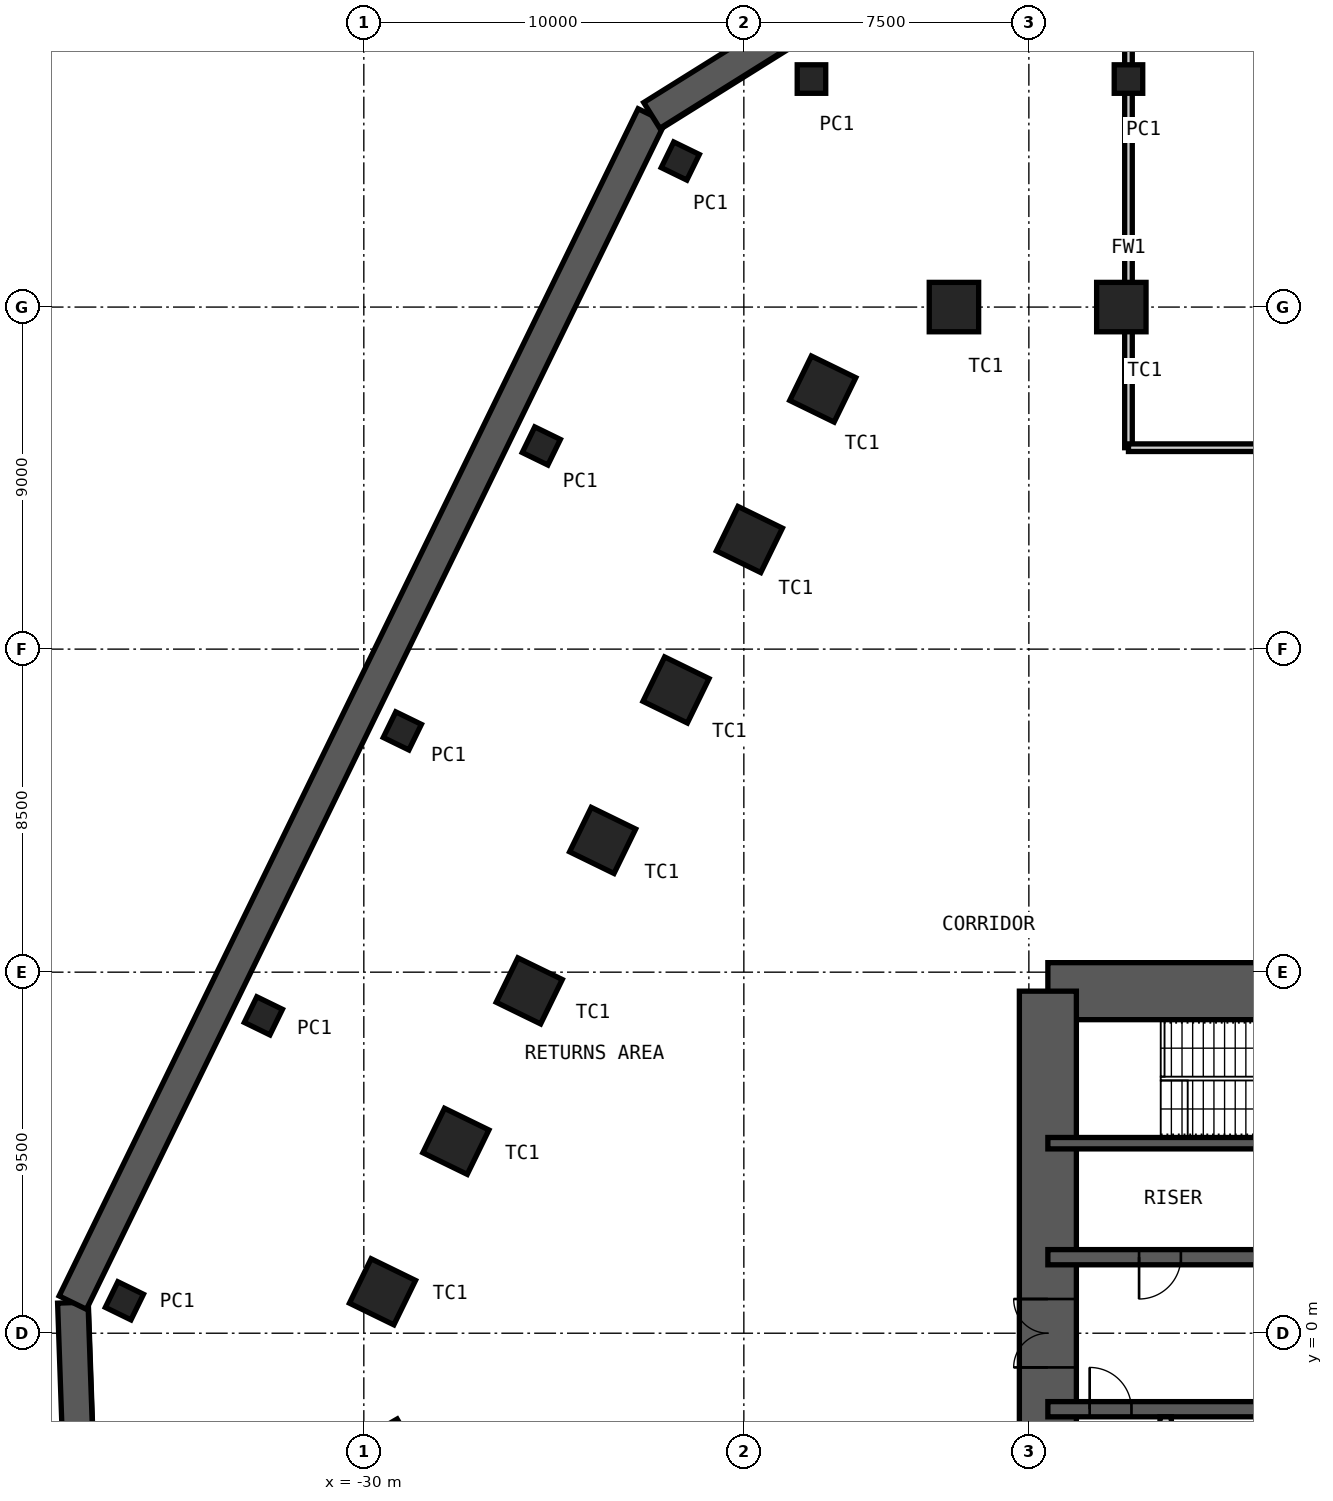
"""IFC4 building model, lengths in metres.
Left out: names, types, materials, properties, quantities, classifications, styles, units other than length and angle.
Written with IfcOpenShell. Run it as: python <this file> out.ifc"""

import sys

from ifc_helpers import new_model, si_unit, direction, frame, frame_2d, origin, origin_2d, place, context, subcontext, project, spatial, rectangle, hollow_rectangle, extrude, element, fill, save


model = new_model("IFC4")
c1 = context("Model", 3, precision=1e-05, world=origin(), true_north=direction((0.0, 1.0)))
c2 = subcontext(c1, "Body", "Model", "MODEL_VIEW")
j1 = project(units=[si_unit("LENGTHUNIT", "METRE"), si_unit("PLANEANGLEUNIT", "RADIAN")], contexts=[c1])
p1 = place(None, origin())
s1 = spatial("IfcSite", under=j1, at=p1, CompositionType="ELEMENT")
p2 = place(p1, origin())
s2 = spatial("IfcBuilding", under=s1, at=p2, CompositionType="ELEMENT")
p3 = place(p2, frame((0.0, 0.0, -6.0)))
s3 = spatial("IfcBuildingStorey", under=s2, at=p3, CompositionType="ELEMENT", Elevation=-6.0)
p4 = place(p3, frame((-37.51, -3.43, 0.0), z_axis=(0.0, 0.0, 1.0), x_axis=(-0.034908677553, 0.999390506375, 0.0)))
e1 = element("IfcWall", 1, at=p4, inside=s3, PredefinedType="SHEAR", context=c2, shape_type="SweptSolid", body=[
    extrude(rectangle(XDim=4.238, YDim=0.8, at=frame_2d((2.119, 0.0))), origin(), (0.0, 0.0, 1.0), 6.0),
])
p5 = place(p3, frame((-37.658, 0.805, 0.0), z_axis=(0.0, 0.0, 1.0), x_axis=(0.438371731429, 0.898793761151, 0.0)))
e2 = element("IfcWall", 2, at=p5, inside=s3, PredefinedType="SHEAR", context=c2, shape_type="SweptSolid", body=[
    extrude(rectangle(XDim=34.755, YDim=0.8, at=frame_2d((17.377, 0.0))), origin(), (0.0, 0.0, 1.0), 6.0),
])
p6 = place(p3, frame((-22.423, 32.043, 0.0), z_axis=(0.0, 0.0, 1.0), x_axis=(0.848065686315, 0.529891113055, 0.0)))
e3 = element("IfcWall", 3, at=p6, inside=s3, PredefinedType="SHEAR", context=c2, shape_type="SweptSolid", body=[
    extrude(rectangle(XDim=4.071, YDim=0.8, at=frame_2d((2.035, 0.0))), origin(), (0.0, 0.0, 1.0), 6.0),
])
for number, where, z_axis, x_axis in (
    (4, (-14.471, 27.0, 0.0), (0.0, 0.0, 1.0), (-1.0, 0.0, 0.0)),
    (5, (-10.067, 27.0, 0.0), (0.0, 0.0, 1.0), (-1.0, 0.0, 0.0)),
    (6, (-29.361, -3.146, 0.0), (0.0, 0.0, 1.0), (0.5, -0.866, 0.0)),
    (7, (-29.509, 1.09, 0.0), (0.0, 0.0, 1.0), (-0.438, -0.899, 0.0)),
    (8, (-27.578, 5.049, 0.0), (0.0, 0.0, 1.0), (-0.438, -0.899, 0.0)),
    (9, (-25.647, 9.008, 0.0), (0.0, 0.0, 1.0), (-0.438, -0.899, 0.0)),
    (10, (-23.716, 12.966, 0.0), (0.0, 0.0, 1.0), (-0.438, -0.899, 0.0)),
    (11, (-21.785, 16.925, 0.0), (0.0, 0.0, 1.0), (-0.438, -0.899, 0.0)),
    (12, (-19.854, 20.884, 0.0), (0.0, 0.0, 1.0), (-0.438, -0.899, 0.0)),
    (13, (-17.924, 24.843, 0.0), (0.0, 0.0, 1.0), (-0.438, -0.899, 0.0)),
):
    element("IfcColumn", number, at=place(p3, frame(where, z_axis=z_axis, x_axis=x_axis)), inside=s3, PredefinedType="COLUMN", context=c2, shape_type="SweptSolid", body=[
        extrude(hollow_rectangle(XDim=1.3, YDim=1.3, WallThickness=0.1, at=origin_2d()), origin(), (0.0, 0.0, 1.0), 6.0),
    ])
for number, where, z_axis, x_axis in (
    (14, (-18.221, 33.0, 0.0), (0.0, 0.0, 1.0), (-1.0, 0.0, 0.0)),
    (15, (-9.879, 33.0, 0.0), (0.0, 0.0, 1.0), (-1.0, 0.0, 0.0)),
    (16, (-36.3, 0.853, 0.0), (0.0, 0.0, 1.0), (-0.438, -0.899, 0.0)),
    (17, (-32.643, 8.35, 0.0), (0.0, 0.0, 1.0), (-0.438, -0.899, 0.0)),
    (18, (-28.986, 15.848, 0.0), (0.0, 0.0, 1.0), (-0.438, -0.899, 0.0)),
    (19, (-25.33, 23.345, 0.0), (0.0, 0.0, 1.0), (-0.438, -0.899, 0.0)),
    (20, (-21.673, 30.843, 0.0), (0.0, 0.0, 1.0), (-0.438, -0.899, 0.0)),
):
    element("IfcColumn", number, at=place(p3, frame(where, z_axis=z_axis, x_axis=x_axis)), inside=s3, PredefinedType="COLUMN", context=c2, shape_type="SweptSolid", body=[
        extrude(hollow_rectangle(XDim=0.75, YDim=0.75, WallThickness=0.036, at=origin_2d()), origin(), (0.0, 0.0, 1.0), 6.0),
    ])
p7 = place(p3, frame((-12.0, 9.0, 0.0), z_axis=(0.0, 0.0, 1.0), x_axis=(1.0, 0.0, 0.0)))
e21 = element("IfcWall", 21, at=p7, inside=s3, PredefinedType="SHEAR", context=c2, shape_type="SweptSolid", body=[
    extrude(rectangle(XDim=24.0, YDim=1.5, at=frame_2d((12.0, 0.0))), origin(), (0.0, 0.0, 1.0), 6.0),
])
p8 = place(p7, frame((10.4, 0.0, 0.0)))
e22 = element("IfcOpeningElement", 22, at=p8, cuts=e21, PredefinedType="OPENING", context=c2, shape_type="SweptSolid", body=[
    extrude(rectangle(XDim=1.0, YDim=2.1, at=frame_2d((0.5, 1.05))), frame((0.0, 0.76, 0.0), z_axis=(0.0, -1.0, 0.0), x_axis=(1.0, 0.0, 0.0)), (0.0, 0.0, 1.0), 1.52),
])
p9 = place(p7, frame((17.6, 0.0, 0.0)))
e23 = element("IfcOpeningElement", 23, at=p9, cuts=e21, PredefinedType="OPENING", context=c2, shape_type="SweptSolid", body=[
    extrude(rectangle(XDim=0.9, YDim=2.1, at=frame_2d((0.45, 1.05))), frame((0.0, 0.76, 0.0), z_axis=(0.0, -1.0, 0.0), x_axis=(1.0, 0.0, 0.0)), (0.0, 0.0, 1.0), 1.52),
])
p10 = place(p7, frame((21.9, 0.0, 0.0)))
e24 = element("IfcOpeningElement", 24, at=p10, cuts=e21, PredefinedType="OPENING", context=c2, shape_type="SweptSolid", body=[
    extrude(rectangle(XDim=0.9, YDim=2.1, at=frame_2d((0.45, 1.05))), frame((0.0, 0.76, 0.0), z_axis=(0.0, -1.0, 0.0), x_axis=(1.0, 0.0, 0.0)), (0.0, 0.0, 1.0), 1.52),
])
p11 = place(p3, frame((-12.0, -9.0, 0.0), z_axis=(0.0, 0.0, 1.0), x_axis=(0.0, 1.0, 0.0)))
e25 = element("IfcWall", 25, at=p11, inside=s3, PredefinedType="SHEAR", context=c2, shape_type="SweptSolid", body=[
    extrude(rectangle(XDim=18.0, YDim=1.5, at=frame_2d((9.0, 0.0))), origin(), (0.0, 0.0, 1.0), 6.0),
])
p12 = place(p11, frame((8.1, 0.0, 0.0)))
e26 = element("IfcOpeningElement", 26, at=p12, cuts=e25, PredefinedType="OPENING", context=c2, shape_type="SweptSolid", body=[
    extrude(rectangle(XDim=1.8, YDim=2.1, at=frame_2d((0.9, 1.05))), frame((0.0, 0.76, 0.0), z_axis=(0.0, -1.0, 0.0), x_axis=(1.0, 0.0, 0.0)), (0.0, 0.0, 1.0), 1.52),
])
p13 = place(p3, frame((-12.0, 5.0, 0.0), z_axis=(0.0, 0.0, 1.0), x_axis=(1.0, 0.0, 0.0)))
e27 = element("IfcWall", 27, at=p13, inside=s3, PredefinedType="SHEAR", context=c2, shape_type="SweptSolid", body=[
    extrude(rectangle(XDim=24.0, YDim=0.3, at=frame_2d((12.0, 0.0))), origin(), (0.0, 0.0, 1.0), 6.0),
])
p14 = place(p3, frame((-12.0, 2.0, 0.0), z_axis=(0.0, 0.0, 1.0), x_axis=(1.0, 0.0, 0.0)))
e28 = element("IfcWall", 28, at=p14, inside=s3, PredefinedType="SHEAR", context=c2, shape_type="SweptSolid", body=[
    extrude(rectangle(XDim=24.0, YDim=0.4, at=frame_2d((12.0, 0.0))), origin(), (0.0, 0.0, 1.0), 6.0),
])
p15 = place(p14, frame((2.4, 0.0, 0.0)))
e29 = element("IfcOpeningElement", 29, at=p15, cuts=e28, PredefinedType="OPENING", context=c2, shape_type="SweptSolid", body=[
    extrude(rectangle(XDim=1.1, YDim=2.1, at=frame_2d((0.55, 1.05))), frame((0.0, 0.21, 0.0), z_axis=(0.0, -1.0, 0.0), x_axis=(1.0, 0.0, 0.0)), (0.0, 0.0, 1.0), 0.42),
])
p16 = place(p14, frame((22.0, 0.0, 0.0)))
e30 = element("IfcOpeningElement", 30, at=p16, cuts=e28, PredefinedType="OPENING", context=c2, shape_type="SweptSolid", body=[
    extrude(rectangle(XDim=1.1, YDim=2.1, at=frame_2d((0.55, 1.05))), frame((0.0, 0.21, 0.0), z_axis=(0.0, -1.0, 0.0), x_axis=(1.0, 0.0, 0.0)), (0.0, 0.0, 1.0), 0.42),
])
p17 = place(p14, frame((10.15, 0.0, 0.0)))
e31 = element("IfcOpeningElement", 31, at=p17, cuts=e28, PredefinedType="OPENING", context=c2, shape_type="SweptSolid", body=[
    extrude(rectangle(XDim=1.0, YDim=2.1, at=frame_2d((0.5, 1.05))), frame((0.0, 0.21, 0.0), z_axis=(0.0, -1.0, 0.0), x_axis=(1.0, 0.0, 0.0)), (0.0, 0.0, 1.0), 0.42),
])
p18 = place(p14, frame((6.7, 0.0, 0.0)))
e32 = element("IfcOpeningElement", 32, at=p18, cuts=e28, PredefinedType="OPENING", context=c2, shape_type="SweptSolid", body=[
    extrude(rectangle(XDim=1.4, YDim=2.4, at=frame_2d((0.7, 1.2))), frame((0.0, 0.21, 0.0), z_axis=(0.0, -1.0, 0.0), x_axis=(1.0, 0.0, 0.0)), (0.0, 0.0, 1.0), 0.42),
])
p19 = place(p3, frame((-12.0, -2.0, 0.0), z_axis=(0.0, 0.0, 1.0), x_axis=(1.0, 0.0, 0.0)))
e33 = element("IfcWall", 33, at=p19, inside=s3, PredefinedType="SHEAR", context=c2, shape_type="SweptSolid", body=[
    extrude(rectangle(XDim=24.0, YDim=0.4, at=frame_2d((12.0, 0.0))), origin(), (0.0, 0.0, 1.0), 6.0),
])
p20 = place(p19, frame((1.1, 0.0, 0.0)))
e34 = element("IfcOpeningElement", 34, at=p20, cuts=e33, PredefinedType="OPENING", context=c2, shape_type="SweptSolid", body=[
    extrude(rectangle(XDim=1.1, YDim=2.1, at=frame_2d((0.55, 1.05))), frame((0.0, 0.21, 0.0), z_axis=(0.0, -1.0, 0.0), x_axis=(1.0, 0.0, 0.0)), (0.0, 0.0, 1.0), 0.42),
])
p21 = place(p19, frame((13.55, 0.0, 0.0)))
e35 = element("IfcOpeningElement", 35, at=p21, cuts=e33, PredefinedType="OPENING", context=c2, shape_type="SweptSolid", body=[
    extrude(rectangle(XDim=1.1, YDim=2.1, at=frame_2d((0.55, 1.05))), frame((0.0, 0.21, 0.0), z_axis=(0.0, -1.0, 0.0), x_axis=(1.0, 0.0, 0.0)), (0.0, 0.0, 1.0), 0.42),
])
p22 = place(p19, frame((20.7, 0.0, 0.0)))
e36 = element("IfcOpeningElement", 36, at=p22, cuts=e33, PredefinedType="OPENING", context=c2, shape_type="SweptSolid", body=[
    extrude(rectangle(XDim=1.1, YDim=2.1, at=frame_2d((0.55, 1.05))), frame((0.0, 0.21, 0.0), z_axis=(0.0, -1.0, 0.0), x_axis=(1.0, 0.0, 0.0)), (0.0, 0.0, 1.0), 0.42),
])
p23 = place(p3, frame((-8.9, -4.85, 0.0), z_axis=(0.0, 0.0, 1.0), x_axis=(0.0, 1.0, 0.0)))
e37 = element("IfcWall", 37, at=p23, inside=s3, PredefinedType="PARTITIONING", context=c2, shape_type="SweptSolid", body=[
    extrude(rectangle(XDim=2.65, YDim=0.3, at=frame_2d((1.325, 0.0))), origin(), (0.0, 0.0, 1.0), 5.78),
])
p24 = place(p3, frame((-9.879, 33.8, 0.0), z_axis=(0.0, 0.0, 1.0), x_axis=(0.0, -1.0, 0.0)))
e38 = element("IfcWall", 38, at=p24, inside=s3, PredefinedType="PARTITIONING", context=c2, shape_type="SweptSolid", body=[
    extrude(rectangle(XDim=10.5, YDim=0.2, at=frame_2d((5.25, 0.0))), origin(), (0.0, 0.0, 1.0), 5.75),
])
p25 = place(p3, frame((-9.879, 23.3, 0.0), z_axis=(0.0, 0.0, 1.0), x_axis=(1.0, 0.0, 0.0)))
e39 = element("IfcWall", 39, at=p25, inside=s3, PredefinedType="PARTITIONING", context=c2, shape_type="SweptSolid", body=[
    extrude(rectangle(XDim=16.684, YDim=0.2, at=frame_2d((8.342, 0.0))), origin(), (0.0, 0.0, 1.0), 5.75),
])
p26 = place(p25, frame((7.342, 0.0, 0.0)))
e40 = element("IfcOpeningElement", 40, at=p26, cuts=e39, PredefinedType="OPENING", context=c2, shape_type="SweptSolid", body=[
    extrude(rectangle(XDim=2.0, YDim=2.4, at=frame_2d((1.0, 1.2))), frame((0.0, 0.11, 0.0), z_axis=(0.0, -1.0, 0.0), x_axis=(1.0, 0.0, 0.0)), (0.0, 0.0, 1.0), 0.22),
])
p27 = place(p15, origin())
e41 = element("IfcDoor", 41, at=p27, inside=s3, OperationType="SINGLE_SWING_LEFT", PredefinedType="DOOR", context=c2, shape_type="SweptSolid", body=[
    extrude(rectangle(XDim=1.1, YDim=2.1, at=frame_2d((0.55, 1.05))), frame((0.0, 0.025, 0.0), z_axis=(0.0, -1.0, 0.0), x_axis=(1.0, 0.0, 0.0)), (0.0, 0.0, 1.0), 0.05),
])
fill(e29, e41)
p28 = place(p20, origin())
e42 = element("IfcDoor", 42, at=p28, inside=s3, OperationType="SINGLE_SWING_RIGHT", PredefinedType="DOOR", context=c2, shape_type="SweptSolid", body=[
    extrude(rectangle(XDim=1.1, YDim=2.1, at=frame_2d((0.55, 1.05))), frame((0.0, 0.025, 0.0), z_axis=(0.0, -1.0, 0.0), x_axis=(1.0, 0.0, 0.0)), (0.0, 0.0, 1.0), 0.05),
])
fill(e34, e42)
p29 = place(p12, origin())
e43 = element("IfcDoor", 43, at=p29, inside=s3, OperationType="DOUBLE_DOOR_DOUBLE_SWING", PredefinedType="DOOR", context=c2, shape_type="SweptSolid", body=[
    extrude(rectangle(XDim=1.8, YDim=2.1, at=frame_2d((0.9, 1.05))), frame((0.0, 0.025, 0.0), z_axis=(0.0, -1.0, 0.0), x_axis=(1.0, 0.0, 0.0)), (0.0, 0.0, 1.0), 0.05),
])
fill(e26, e43)
save(model, sys.argv[1])
